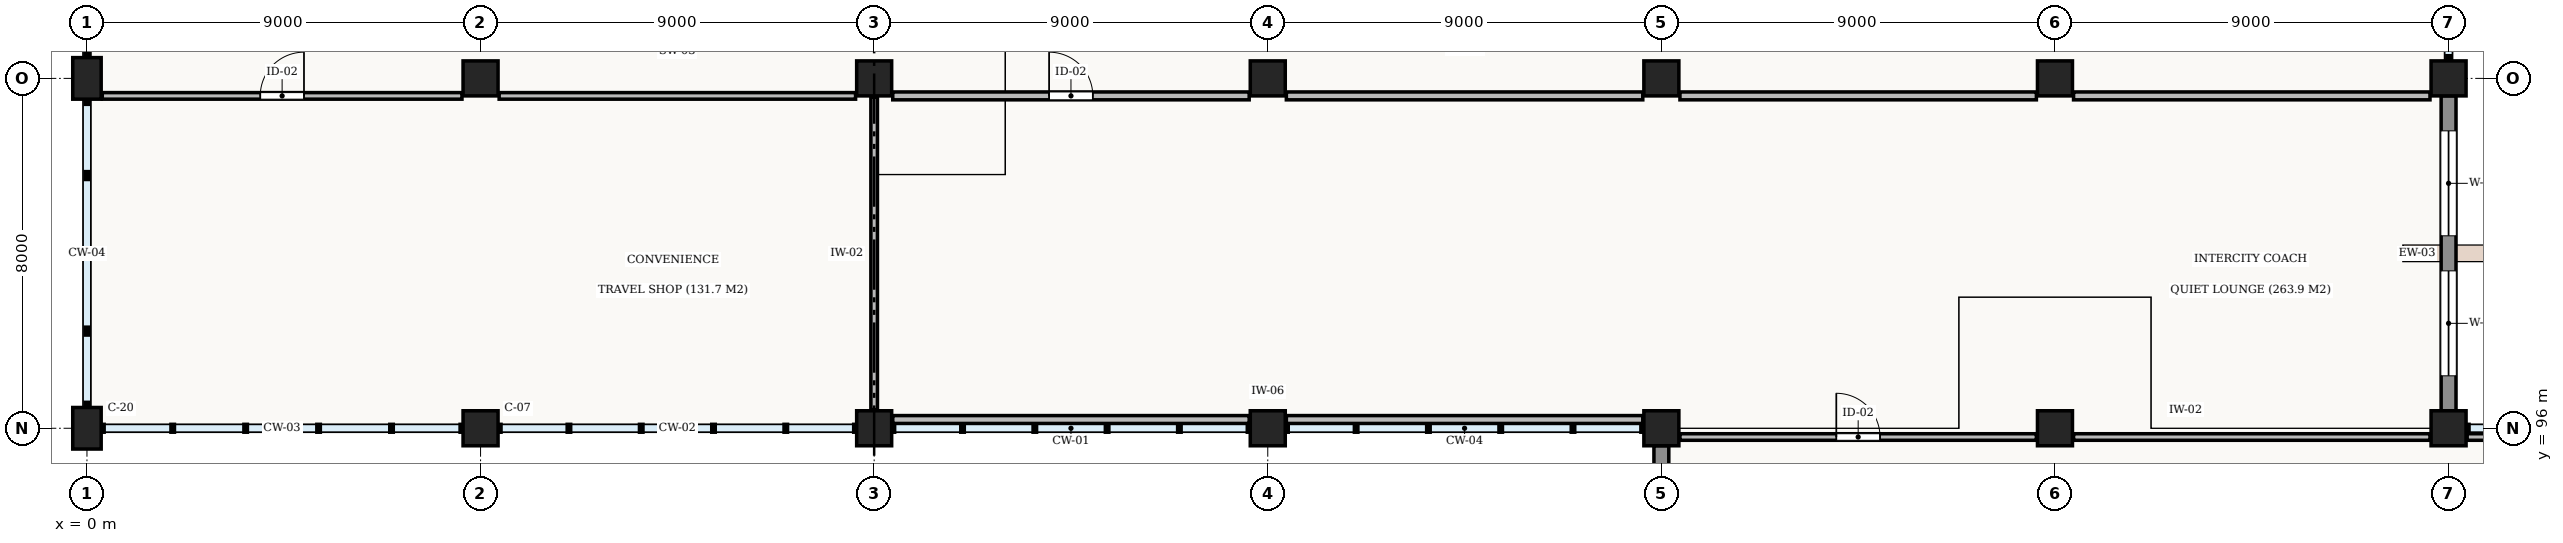
"""IFC4 building model, lengths in metres.
Left out: names, types, materials, properties, quantities, classifications, styles, units other than length and angle.
Written with IfcOpenShell. Run it as: python <this file> out.ifc"""

import sys

from ifc_helpers import new_model, si_unit, direction, frame, frame_2d, origin, origin_2d, place, context, subcontext, project, spatial, rectangle, extrude, element, fill, save


model = new_model("IFC4")
c1 = context("Model", 3, precision=1e-05, world=origin(), true_north=direction((0.0, 1.0)))
c2 = subcontext(c1, "Body", "Model", "MODEL_VIEW")
j1 = project(units=[si_unit("LENGTHUNIT", "METRE"), si_unit("PLANEANGLEUNIT", "RADIAN")], contexts=[c1])
p1 = place(None, origin())
s1 = spatial("IfcSite", under=j1, at=p1, CompositionType="ELEMENT")
p2 = place(p1, origin())
s2 = spatial("IfcBuilding", under=s1, at=p2, CompositionType="ELEMENT")
p3 = place(p2, frame((0.0, 0.0, 5.4)))
s3 = spatial("IfcBuildingStorey", under=s2, at=p3, CompositionType="ELEMENT", Elevation=5.4)
for number, where, z_axis, x_axis in (
    (1, (0.0, 96.0, 0.0), (0.0, 0.0, 1.0), (1.0, 0.0, 0.0)),
    (2, (0.0, 104.0, 0.0), (0.0, 0.0, 1.0), (1.0, 0.0, 0.0)),
):
    element("IfcColumn", number, at=place(p3, frame(where, z_axis=z_axis, x_axis=x_axis)), inside=s3, PredefinedType="COLUMN", context=c2, shape_type="SweptSolid", body=[
        extrude(rectangle(XDim=0.65, YDim=0.95, at=origin_2d()), origin(), (0.0, 0.0, 1.0), 4.8),
    ])
for number, where, z_axis, x_axis in (
    (3, (9.0, 96.0, 0.0), (0.0, 0.0, 1.0), (1.0, 0.0, 0.0)),
    (4, (9.0, 104.0, 0.0), (0.0, 0.0, 1.0), (1.0, 0.0, 0.0)),
    (5, (18.0, 96.0, 0.0), (0.0, 0.0, 1.0), (1.0, 0.0, 0.0)),
    (6, (18.0, 104.0, 0.0), (0.0, 0.0, 1.0), (1.0, 0.0, 0.0)),
    (7, (27.0, 96.0, 0.0), (0.0, 0.0, 1.0), (1.0, 0.0, 0.0)),
    (8, (27.0, 104.0, 0.0), (0.0, 0.0, 1.0), (1.0, 0.0, 0.0)),
    (9, (36.0, 96.0, 0.0), (0.0, 0.0, 1.0), (1.0, 0.0, 0.0)),
    (10, (36.0, 104.0, 0.0), (0.0, 0.0, 1.0), (1.0, 0.0, 0.0)),
    (11, (45.0, 96.0, 0.0), (0.0, 0.0, 1.0), (1.0, 0.0, 0.0)),
    (12, (45.0, 104.0, 0.0), (0.0, 0.0, 1.0), (1.0, 0.0, 0.0)),
    (13, (54.0, 96.0, 0.0), (0.0, 0.0, 1.0), (1.0, 0.0, 0.0)),
    (14, (54.0, 104.0, 0.0), (0.0, 0.0, 1.0), (1.0, 0.0, 0.0)),
):
    element("IfcColumn", number, at=place(p3, frame(where, z_axis=z_axis, x_axis=x_axis)), inside=s3, PredefinedType="COLUMN", context=c2, shape_type="SweptSolid", body=[
        extrude(rectangle(XDim=0.8, YDim=0.8, at=origin_2d()), origin(), (0.0, 0.0, 1.0), 4.8),
    ])
p4 = place(p3, frame((36.0, 88.398, 0.0), z_axis=(0.0, 0.0, 1.0), x_axis=(0.0, 1.0, 0.0)))
e15 = element("IfcWall", 15, at=p4, inside=s3, PredefinedType="STANDARD", context=c2, shape_type="SweptSolid", body=[
    extrude(rectangle(XDim=7.204, YDim=0.34, at=frame_2d((3.602, 0.0))), origin(), (0.0, 0.0, 1.0), 3.86),
])
p5 = place(p4, frame((1.335, 0.0, 0.9)))
e16 = element("IfcOpeningElement", 16, at=p5, cuts=e15, PredefinedType="OPENING", context=c2, shape_type="SweptSolid", body=[
    extrude(rectangle(XDim=1.6, YDim=2.2, at=frame_2d((0.8, 1.1))), frame((0.0, 0.182, 0.0), z_axis=(0.0, -1.0, 0.0), x_axis=(1.0, 0.0, 0.0)), (0.0, 0.0, 1.0), 0.364),
])
p6 = place(p4, frame((4.269, 0.0, 0.9)))
e17 = element("IfcOpeningElement", 17, at=p6, cuts=e15, PredefinedType="OPENING", context=c2, shape_type="SweptSolid", body=[
    extrude(rectangle(XDim=1.6, YDim=2.2, at=frame_2d((0.8, 1.1))), frame((0.0, 0.182, 0.0), z_axis=(0.0, -1.0, 0.0), x_axis=(1.0, 0.0, 0.0)), (0.0, 0.0, 1.0), 0.364),
])
p7 = place(p3, frame((54.0, 103.602, 0.0), z_axis=(0.0, 0.0, 1.0), x_axis=(0.0, -1.0, 0.0)))
e18 = element("IfcWall", 18, at=p7, inside=s3, PredefinedType="STANDARD", context=c2, shape_type="SweptSolid", body=[
    extrude(rectangle(XDim=7.204, YDim=0.34, at=frame_2d((3.602, 0.0))), origin(), (0.0, 0.0, 1.0), 3.86),
])
p8 = place(p7, frame((0.801, 0.0, 0.9)))
e19 = element("IfcOpeningElement", 19, at=p8, cuts=e18, PredefinedType="OPENING", context=c2, shape_type="SweptSolid", body=[
    extrude(rectangle(XDim=2.4, YDim=1.35, at=frame_2d((1.2, 0.675))), frame((0.0, 0.182, 0.0), z_axis=(0.0, -1.0, 0.0), x_axis=(1.0, 0.0, 0.0)), (0.0, 0.0, 1.0), 0.364),
])
p9 = place(p7, frame((4.003, 0.0, 0.9)))
e20 = element("IfcOpeningElement", 20, at=p9, cuts=e18, PredefinedType="OPENING", context=c2, shape_type="SweptSolid", body=[
    extrude(rectangle(XDim=2.4, YDim=1.35, at=frame_2d((1.2, 0.675))), frame((0.0, 0.182, 0.0), z_axis=(0.0, -1.0, 0.0), x_axis=(1.0, 0.0, 0.0)), (0.0, 0.0, 1.0), 0.364),
])
p10 = place(p3, frame((36.425, 95.8, 0.0), z_axis=(0.0, 0.0, 1.0), x_axis=(1.0, 0.0, 0.0)))
e21 = element("IfcWall", 21, at=p10, inside=s3, PredefinedType="STANDARD", context=c2, shape_type="SweptSolid", body=[
    extrude(rectangle(XDim=8.15, YDim=0.15, at=frame_2d((4.075, 0.0))), origin(), (0.0, 0.0, 1.0), 3.76),
])
p11 = place(p10, frame((3.575, 0.0, 0.0)))
e22 = element("IfcOpeningElement", 22, at=p11, cuts=e21, PredefinedType="OPENING", context=c2, shape_type="SweptSolid", body=[
    extrude(rectangle(XDim=1.0, YDim=2.1, at=frame_2d((0.5, 1.05))), frame((0.0, 0.087, 0.0), z_axis=(0.0, -1.0, 0.0), x_axis=(1.0, 0.0, 0.0)), (0.0, 0.0, 1.0), 0.174),
])
p12 = place(p3, frame((45.425, 95.8, 0.0), z_axis=(0.0, 0.0, 1.0), x_axis=(1.0, 0.0, 0.0)))
e23 = element("IfcWall", 23, at=p12, inside=s3, PredefinedType="STANDARD", context=c2, shape_type="SweptSolid", body=[
    extrude(rectangle(XDim=8.15, YDim=0.15, at=frame_2d((4.075, 0.0))), origin(), (0.0, 0.0, 1.0), 3.76),
])
p13 = place(p3, frame((54.425, 95.8, 0.0), z_axis=(0.0, 0.0, 1.0), x_axis=(1.0, 0.0, 0.0)))
e24 = element("IfcWall", 24, at=p13, inside=s3, PredefinedType="STANDARD", context=c2, shape_type="SweptSolid", body=[
    extrude(rectangle(XDim=8.15, YDim=0.15, at=frame_2d((4.075, 0.0))), origin(), (0.0, 0.0, 1.0), 4.48),
])
p14 = place(p3, frame((0.35, 103.6, 0.0), z_axis=(0.0, 0.0, 1.0), x_axis=(1.0, 0.0, 0.0)))
e25 = element("IfcWall", 25, at=p14, inside=s3, PredefinedType="STANDARD", context=c2, shape_type="SweptSolid", body=[
    extrude(rectangle(XDim=8.225, YDim=0.15, at=frame_2d((4.112, 0.0))), origin(), (0.0, 0.0, 1.0), 4.48),
])
p15 = place(p14, frame((3.613, 0.0, 0.0)))
e26 = element("IfcOpeningElement", 26, at=p15, cuts=e25, PredefinedType="OPENING", context=c2, shape_type="SweptSolid", body=[
    extrude(rectangle(XDim=1.0, YDim=2.1, at=frame_2d((0.5, 1.05))), frame((0.0, 0.087, 0.0), z_axis=(0.0, -1.0, 0.0), x_axis=(1.0, 0.0, 0.0)), (0.0, 0.0, 1.0), 0.174),
])
p16 = place(p3, frame((9.425, 103.6, 0.0), z_axis=(0.0, 0.0, 1.0), x_axis=(1.0, 0.0, 0.0)))
e27 = element("IfcWall", 27, at=p16, inside=s3, PredefinedType="STANDARD", context=c2, shape_type="SweptSolid", body=[
    extrude(rectangle(XDim=8.15, YDim=0.15, at=frame_2d((4.075, 0.0))), origin(), (0.0, 0.0, 1.0), 4.48),
])
p17 = place(p3, frame((18.0, 96.425, 0.0), z_axis=(0.0, 0.0, 1.0), x_axis=(0.0, 1.0, 0.0)))
e28 = element("IfcWall", 28, at=p17, inside=s3, PredefinedType="STANDARD", context=c2, shape_type="SweptSolid", body=[
    extrude(rectangle(XDim=7.15, YDim=0.15, at=frame_2d((3.575, 0.0))), origin(), (0.0, 0.0, 1.0), 3.86),
])
for number, where, z_axis, x_axis in (
    (29, (18.425, 96.2, 0.0), (0.0, 0.0, 1.0), (1.0, 0.0, 0.0)),
    (30, (27.425, 96.2, 0.0), (0.0, 0.0, 1.0), (1.0, 0.0, 0.0)),
):
    element("IfcWall", number, at=place(p3, frame(where, z_axis=z_axis, x_axis=x_axis)), inside=s3, PredefinedType="STANDARD", context=c2, shape_type="SweptSolid", body=[
        extrude(rectangle(XDim=8.15, YDim=0.18, at=frame_2d((4.075, 0.0))), origin(), (0.0, 0.0, 1.0), 4.48),
    ])
p18 = place(p3, frame((18.425, 103.6, 0.0), z_axis=(0.0, 0.0, 1.0), x_axis=(1.0, 0.0, 0.0)))
e31 = element("IfcWall", 31, at=p18, inside=s3, PredefinedType="STANDARD", context=c2, shape_type="SweptSolid", body=[
    extrude(rectangle(XDim=8.15, YDim=0.18, at=frame_2d((4.075, 0.0))), origin(), (0.0, 0.0, 1.0), 4.48),
])
p19 = place(p18, frame((3.575, 0.0, 0.0)))
e32 = element("IfcOpeningElement", 32, at=p19, cuts=e31, PredefinedType="OPENING", context=c2, shape_type="SweptSolid", body=[
    extrude(rectangle(XDim=1.0, YDim=2.1, at=frame_2d((0.5, 1.05))), frame((0.0, 0.102, 0.0), z_axis=(0.0, -1.0, 0.0), x_axis=(1.0, 0.0, 0.0)), (0.0, 0.0, 1.0), 0.204),
])
for number, where, z_axis, x_axis in (
    (33, (27.425, 103.6, 0.0), (0.0, 0.0, 1.0), (1.0, 0.0, 0.0)),
    (34, (36.425, 103.6, 0.0), (0.0, 0.0, 1.0), (1.0, 0.0, 0.0)),
    (35, (45.425, 103.6, 0.0), (0.0, 0.0, 1.0), (1.0, 0.0, 0.0)),
):
    element("IfcWall", number, at=place(p3, frame(where, z_axis=z_axis, x_axis=x_axis)), inside=s3, PredefinedType="STANDARD", context=c2, shape_type="SweptSolid", body=[
        extrude(rectangle(XDim=8.15, YDim=0.18, at=frame_2d((4.075, 0.0))), origin(), (0.0, 0.0, 1.0), 4.48),
    ])
p20 = place(p8, origin())
e36 = element("IfcWindow", 36, at=p20, inside=s3, PartitioningType="SINGLE_PANEL", PredefinedType="WINDOW", context=c2, shape_type="SweptSolid", body=[
    extrude(rectangle(XDim=2.4, YDim=1.35, at=frame_2d((1.2, 0.675))), frame((0.0, 0.03, 0.0), z_axis=(0.0, -1.0, 0.0), x_axis=(1.0, 0.0, 0.0)), (0.0, 0.0, 1.0), 0.06),
])
fill(e19, e36)
p21 = place(p9, origin())
e37 = element("IfcWindow", 37, at=p21, inside=s3, PartitioningType="SINGLE_PANEL", PredefinedType="WINDOW", context=c2, shape_type="SweptSolid", body=[
    extrude(rectangle(XDim=2.4, YDim=1.35, at=frame_2d((1.2, 0.675))), frame((0.0, 0.03, 0.0), z_axis=(0.0, -1.0, 0.0), x_axis=(1.0, 0.0, 0.0)), (0.0, 0.0, 1.0), 0.06),
])
fill(e20, e37)
p22 = place(p11, origin())
e38 = element("IfcDoor", 38, at=p22, inside=s3, OperationType="SINGLE_SWING_LEFT", PredefinedType="DOOR", context=c2, shape_type="SweptSolid", body=[
    extrude(rectangle(XDim=1.0, YDim=2.1, at=frame_2d((0.5, 1.05))), frame((0.0, 0.025, 0.0), z_axis=(0.0, -1.0, 0.0), x_axis=(1.0, 0.0, 0.0)), (0.0, 0.0, 1.0), 0.05),
])
fill(e22, e38)
p23 = place(p15, origin())
e39 = element("IfcDoor", 39, at=p23, inside=s3, OperationType="SINGLE_SWING_RIGHT", PredefinedType="DOOR", context=c2, shape_type="SweptSolid", body=[
    extrude(rectangle(XDim=1.0, YDim=2.1, at=frame_2d((0.5, 1.05))), frame((0.0, 0.025, 0.0), z_axis=(0.0, -1.0, 0.0), x_axis=(1.0, 0.0, 0.0)), (0.0, 0.0, 1.0), 0.05),
])
fill(e26, e39)
p24 = place(p19, origin())
e40 = element("IfcDoor", 40, at=p24, inside=s3, OperationType="SINGLE_SWING_LEFT", PredefinedType="DOOR", context=c2, shape_type="SweptSolid", body=[
    extrude(rectangle(XDim=1.0, YDim=2.1, at=frame_2d((0.5, 1.05))), frame((0.0, 0.025, 0.0), z_axis=(0.0, -1.0, 0.0), x_axis=(1.0, 0.0, 0.0)), (0.0, 0.0, 1.0), 0.05),
])
fill(e32, e40)
save(model, sys.argv[1])
